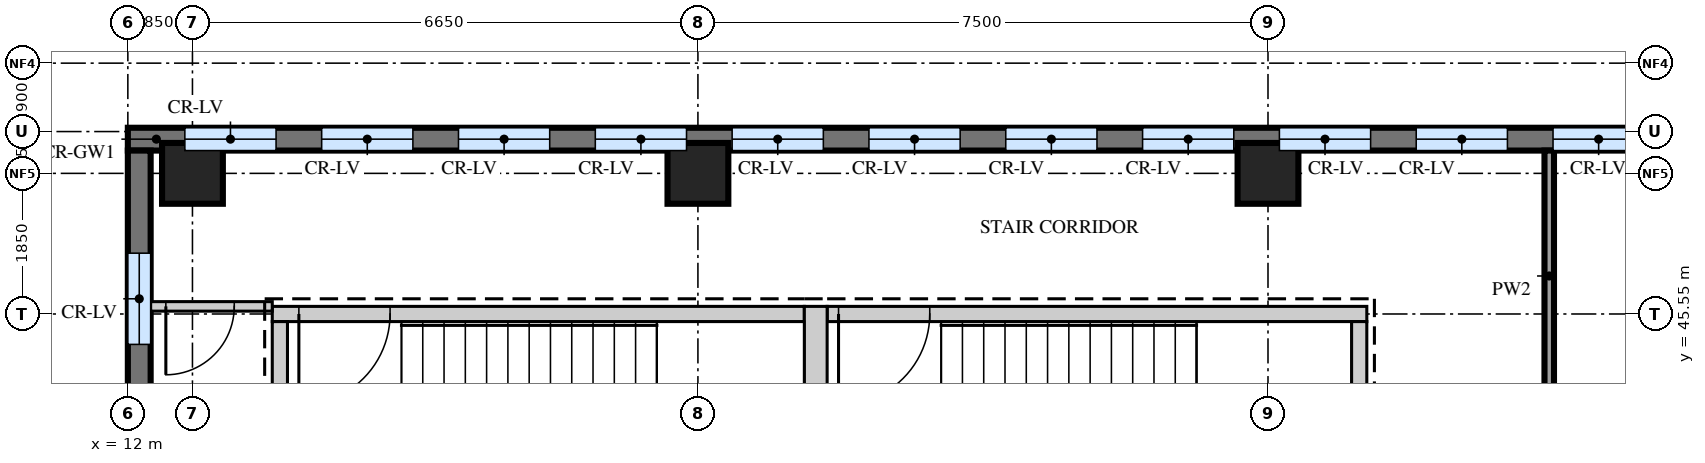
"""IFC4 building model, lengths in metres.
Left out: names, types, materials, properties, quantities, classifications, styles, units other than length and angle.
Written with IfcOpenShell. Run it as: python <this file> out.ifc"""

import sys

from ifc_helpers import new_model, si_unit, direction, frame, frame_2d, origin, origin_2d, place, context, subcontext, project, spatial, rectangle, extrude, source, transform, mapped, element, fill, save


model = new_model("IFC4")
c1 = context("Model", 3, precision=1e-05, world=origin(), true_north=direction((0.0, 1.0)))
c2 = subcontext(c1, "Body", "Model", "MODEL_VIEW")
j1 = project(units=[si_unit("LENGTHUNIT", "METRE"), si_unit("PLANEANGLEUNIT", "RADIAN")], contexts=[c1])
p1 = place(None, origin())
s1 = spatial("IfcSite", under=j1, at=p1, CompositionType="ELEMENT")
p2 = place(p1, origin())
s2 = spatial("IfcBuilding", under=s1, at=p2, CompositionType="ELEMENT")
p3 = place(p2, frame((0.0, 0.0, 330.2)))
s3 = spatial("IfcBuildingStorey", under=s2, at=p3, CompositionType="ELEMENT", Elevation=330.2)
m1 = source(origin(), c2, "Body", "SweptSolid", [
    extrude(rectangle(XDim=7.0, YDim=0.2, at=frame_2d((3.5, 0.0))), origin(), (0.0, 0.0, 1.0), 4.25),
])
p4 = place(p3, frame((13.9, 45.55, 0.0), z_axis=(0.0, 0.0, 1.0), x_axis=(1.0, 0.0, 0.0)))
e1 = element("IfcWall", 1, at=p4, inside=s3, PredefinedType="SHEAR", context=c2, shape_type="MappedRepresentation", body=[
    mapped(m1, transform((0.0, 0.0, 0.0))),
])
m2 = source(origin(), c2, "Body", "SweptSolid", [
    extrude(rectangle(XDim=1.2, YDim=2.1, at=frame_2d((0.6, 1.05))), frame((0.0, 0.11, 0.0), z_axis=(0.0, -1.0, 0.0), x_axis=(1.0, 0.0, 0.0)), (0.0, 0.0, 1.0), 0.22),
])
p5 = place(p4, frame((0.35, 0.0, 0.0)))
e2 = element("IfcOpeningElement", 2, at=p5, cuts=e1, PredefinedType="OPENING", context=c2, shape_type="MappedRepresentation", body=[
    mapped(m2, transform((0.0, 0.0, 0.0))),
])
m3 = source(origin(), c2, "Body", "SweptSolid", [
    extrude(rectangle(XDim=7.1, YDim=0.2, at=frame_2d((3.55, 0.0))), origin(), (0.0, 0.0, 1.0), 4.25),
])
p6 = place(p3, frame((21.2, 45.55, 0.0), z_axis=(0.0, 0.0, 1.0), x_axis=(1.0, 0.0, 0.0)))
e3 = element("IfcWall", 3, at=p6, inside=s3, PredefinedType="SHEAR", context=c2, shape_type="MappedRepresentation", body=[
    mapped(m3, transform((0.0, 0.0, 0.0))),
])
p7 = place(p6, frame((0.15, 0.0, 0.0)))
e4 = element("IfcOpeningElement", 4, at=p7, cuts=e3, PredefinedType="OPENING", context=c2, shape_type="MappedRepresentation", body=[
    mapped(m2, transform((0.0, 0.0, 0.0))),
])
m4 = source(origin(), c2, "Body", "SweptSolid", [
    extrude(rectangle(XDim=3.75, YDim=0.3, at=frame_2d((1.875, 0.0))), origin(), (0.0, 0.0, 1.0), 4.25),
])
p8 = place(p3, frame((21.05, 41.9, 0.0), z_axis=(0.0, 0.0, 1.0), x_axis=(0.0, 1.0, 0.0)))
e5 = element("IfcWall", 5, at=p8, inside=s3, PredefinedType="SHEAR", context=c2, shape_type="MappedRepresentation", body=[
    mapped(m4, transform((0.0, 0.0, 0.0))),
])
m5 = source(origin(), c2, "Body", "SweptSolid", [
    extrude(rectangle(XDim=3.35, YDim=0.2, at=frame_2d((1.675, 0.0))), origin(), (0.0, 0.0, 1.0), 4.25),
])
for number, where, z_axis, x_axis in (
    (6, (14.0, 42.1, 0.0), (0.0, 0.0, 1.0), (0.0, 1.0, 0.0)),
    (7, (28.2, 42.1, 0.0), (0.0, 0.0, 1.0), (0.0, 1.0, 0.0)),
):
    element("IfcWall", number, at=place(p3, frame(where, z_axis=z_axis, x_axis=x_axis)), inside=s3, PredefinedType="SHEAR", context=c2, shape_type="MappedRepresentation", body=[
        mapped(m5, transform((0.0, 0.0, 0.0))),
    ])
m6 = source(origin(), c2, "Body", "SweptSolid", [
    extrude(rectangle(XDim=0.8, YDim=0.8, at=origin_2d()), origin(), (0.0, 0.0, 1.0), 4.5),
])
for number, where, z_axis, x_axis in (
    (8, (12.85, 47.4, 0.0), (0.0, 0.0, 1.0), (1.0, 0.0, 0.0)),
    (9, (19.5, 47.4, 0.0), (0.0, 0.0, 1.0), (1.0, 0.0, 0.0)),
    (10, (27.0, 47.4, 0.0), (0.0, 0.0, 1.0), (1.0, 0.0, 0.0)),
):
    element("IfcColumn", number, at=place(p3, frame(where, z_axis=z_axis, x_axis=x_axis)), inside=s3, PredefinedType="COLUMN", context=c2, shape_type="MappedRepresentation", body=[
        mapped(m6, transform((0.0, 0.0, 0.0))),
    ])
m7 = source(origin(), c2, "Body", "SweptSolid", [
    extrude(rectangle(XDim=29.7, YDim=0.3, at=frame_2d((14.85, 0.0))), origin(), (0.0, 0.0, 1.0), 4.5),
])
p9 = place(p3, frame((41.7, 47.85, 0.0), z_axis=(0.0, 0.0, 1.0), x_axis=(-1.0, 0.0, 0.0)))
e11 = element("IfcWall", 11, at=p9, inside=s3, PredefinedType="SOLIDWALL", context=c2, shape_type="MappedRepresentation", body=[
    mapped(m7, transform((0.0, 0.0, 0.0))),
])
m8 = source(origin(), c2, "Body", "SweptSolid", [
    extrude(rectangle(XDim=1.2, YDim=2.4, at=frame_2d((0.6, 1.2))), frame((0.0, 0.16, 0.0), z_axis=(0.0, -1.0, 0.0), x_axis=(1.0, 0.0, 0.0)), (0.0, 0.0, 1.0), 0.32),
])
p10 = place(p9, frame((0.75, 0.0, 0.9)))
e12 = element("IfcOpeningElement", 12, at=p10, cuts=e11, PredefinedType="OPENING", context=c2, shape_type="MappedRepresentation", body=[
    mapped(m8, transform((0.0, 0.0, 0.0))),
])
p11 = place(p9, frame((2.55, 0.0, 0.9)))
e13 = element("IfcOpeningElement", 13, at=p11, cuts=e11, PredefinedType="OPENING", context=c2, shape_type="MappedRepresentation", body=[
    mapped(m8, transform((0.0, 0.0, 0.0))),
])
p12 = place(p9, frame((4.35, 0.0, 0.9)))
e14 = element("IfcOpeningElement", 14, at=p12, cuts=e11, PredefinedType="OPENING", context=c2, shape_type="MappedRepresentation", body=[
    mapped(m8, transform((0.0, 0.0, 0.0))),
])
p13 = place(p9, frame((6.15, 0.0, 0.9)))
e15 = element("IfcOpeningElement", 15, at=p13, cuts=e11, PredefinedType="OPENING", context=c2, shape_type="MappedRepresentation", body=[
    mapped(m8, transform((0.0, 0.0, 0.0))),
])
p14 = place(p9, frame((7.95, 0.0, 0.9)))
e16 = element("IfcOpeningElement", 16, at=p14, cuts=e11, PredefinedType="OPENING", context=c2, shape_type="MappedRepresentation", body=[
    mapped(m8, transform((0.0, 0.0, 0.0))),
])
p15 = place(p9, frame((9.75, 0.0, 0.9)))
e17 = element("IfcOpeningElement", 17, at=p15, cuts=e11, PredefinedType="OPENING", context=c2, shape_type="MappedRepresentation", body=[
    mapped(m8, transform((0.0, 0.0, 0.0))),
])
p16 = place(p9, frame((11.55, 0.0, 0.9)))
e18 = element("IfcOpeningElement", 18, at=p16, cuts=e11, PredefinedType="OPENING", context=c2, shape_type="MappedRepresentation", body=[
    mapped(m8, transform((0.0, 0.0, 0.0))),
])
p17 = place(p9, frame((13.35, 0.0, 0.9)))
e19 = element("IfcOpeningElement", 19, at=p17, cuts=e11, PredefinedType="OPENING", context=c2, shape_type="MappedRepresentation", body=[
    mapped(m8, transform((0.0, 0.0, 0.0))),
])
p18 = place(p9, frame((15.15, 0.0, 0.9)))
e20 = element("IfcOpeningElement", 20, at=p18, cuts=e11, PredefinedType="OPENING", context=c2, shape_type="MappedRepresentation", body=[
    mapped(m8, transform((0.0, 0.0, 0.0))),
])
p19 = place(p9, frame((16.95, 0.0, 0.9)))
e21 = element("IfcOpeningElement", 21, at=p19, cuts=e11, PredefinedType="OPENING", context=c2, shape_type="MappedRepresentation", body=[
    mapped(m8, transform((0.0, 0.0, 0.0))),
])
p20 = place(p9, frame((18.75, 0.0, 0.9)))
e22 = element("IfcOpeningElement", 22, at=p20, cuts=e11, PredefinedType="OPENING", context=c2, shape_type="MappedRepresentation", body=[
    mapped(m8, transform((0.0, 0.0, 0.0))),
])
p21 = place(p9, frame((20.55, 0.0, 0.9)))
e23 = element("IfcOpeningElement", 23, at=p21, cuts=e11, PredefinedType="OPENING", context=c2, shape_type="MappedRepresentation", body=[
    mapped(m8, transform((0.0, 0.0, 0.0))),
])
p22 = place(p9, frame((22.35, 0.0, 0.9)))
e24 = element("IfcOpeningElement", 24, at=p22, cuts=e11, PredefinedType="OPENING", context=c2, shape_type="MappedRepresentation", body=[
    mapped(m8, transform((0.0, 0.0, 0.0))),
])
p23 = place(p9, frame((24.15, 0.0, 0.9)))
e25 = element("IfcOpeningElement", 25, at=p23, cuts=e11, PredefinedType="OPENING", context=c2, shape_type="MappedRepresentation", body=[
    mapped(m8, transform((0.0, 0.0, 0.0))),
])
p24 = place(p9, frame((25.95, 0.0, 0.9)))
e26 = element("IfcOpeningElement", 26, at=p24, cuts=e11, PredefinedType="OPENING", context=c2, shape_type="MappedRepresentation", body=[
    mapped(m8, transform((0.0, 0.0, 0.0))),
])
p25 = place(p9, frame((27.75, 0.0, 0.9)))
e27 = element("IfcOpeningElement", 27, at=p25, cuts=e11, PredefinedType="OPENING", context=c2, shape_type="MappedRepresentation", body=[
    mapped(m8, transform((0.0, 0.0, 0.0))),
])
m9 = source(origin(), c2, "Body", "SweptSolid", [
    extrude(rectangle(XDim=5.7, YDim=0.3, at=frame_2d((2.85, 0.0))), origin(), (0.0, 0.0, 1.0), 4.5),
])
p26 = place(p3, frame((12.15, 47.7, 0.0), z_axis=(0.0, 0.0, 1.0), x_axis=(0.0, -1.0, 0.0)))
e28 = element("IfcWall", 28, at=p26, inside=s3, PredefinedType="SOLIDWALL", context=c2, shape_type="MappedRepresentation", body=[
    mapped(m9, transform((0.0, 0.0, 0.0))),
])
p27 = place(p26, frame((1.35, 0.0, 0.9)))
e29 = element("IfcOpeningElement", 29, at=p27, cuts=e28, PredefinedType="OPENING", context=c2, shape_type="MappedRepresentation", body=[
    mapped(m8, transform((0.0, 0.0, 0.0))),
])
p28 = place(p26, frame((3.15, 0.0, 0.9)))
e30 = element("IfcOpeningElement", 30, at=p28, cuts=e28, PredefinedType="OPENING", context=c2, shape_type="MappedRepresentation", body=[
    mapped(m8, transform((0.0, 0.0, 0.0))),
])
m10 = source(origin(), c2, "Body", "SweptSolid", [
    extrude(rectangle(XDim=8.6, YDim=0.125, at=frame_2d((4.3, 0.0))), origin(), (0.0, 0.0, 1.0), 4.3),
])
p29 = place(p3, frame((30.7, 39.1, 0.0), z_axis=(0.0, 0.0, 1.0), x_axis=(0.0, 1.0, 0.0)))
e31 = element("IfcWall", 31, at=p29, inside=s3, PredefinedType="PARTITIONING", context=c2, shape_type="MappedRepresentation", body=[
    mapped(m10, transform((0.0, 0.0, 0.0))),
])
m11 = source(origin(), c2, "Body", "SweptSolid", [
    extrude(rectangle(XDim=0.9, YDim=2.1, at=frame_2d((0.45, 1.05))), frame((0.0, 0.073, 0.0), z_axis=(0.0, -1.0, 0.0), x_axis=(1.0, 0.0, 0.0)), (0.0, 0.0, 1.0), 0.145),
])
p30 = place(p29, frame((0.8, 0.0, 0.0)))
e32 = element("IfcOpeningElement", 32, at=p30, cuts=e31, PredefinedType="OPENING", context=c2, shape_type="MappedRepresentation", body=[
    mapped(m11, transform((0.0, 0.0, 0.0))),
])
m12 = source(origin(), c2, "Body", "SweptSolid", [
    extrude(rectangle(XDim=1.2, YDim=2.1, at=frame_2d((0.6, 1.05))), frame((0.0, 0.073, 0.0), z_axis=(0.0, -1.0, 0.0), x_axis=(1.0, 0.0, 0.0)), (0.0, 0.0, 1.0), 0.145),
])
p31 = place(p29, frame((4.1, 0.0, 0.0)))
e33 = element("IfcOpeningElement", 33, at=p31, cuts=e31, PredefinedType="OPENING", context=c2, shape_type="MappedRepresentation", body=[
    mapped(m12, transform((0.0, 0.0, 0.0))),
])
m13 = source(origin(), c2, "Body", "SweptSolid", [
    extrude(rectangle(XDim=1.6, YDim=0.125, at=frame_2d((0.8, 0.0))), origin(), (0.0, 0.0, 1.0), 4.3),
])
p32 = place(p3, frame((12.3, 45.65, 0.0), z_axis=(0.0, 0.0, 1.0), x_axis=(1.0, 0.0, 0.0)))
e34 = element("IfcWall", 34, at=p32, inside=s3, PredefinedType="PARTITIONING", context=c2, shape_type="MappedRepresentation", body=[
    mapped(m13, transform((0.0, 0.0, 0.0))),
])
p33 = place(p32, frame((0.2, 0.0, 0.0)))
e35 = element("IfcOpeningElement", 35, at=p33, cuts=e34, PredefinedType="OPENING", context=c2, shape_type="MappedRepresentation", body=[
    mapped(m11, transform((0.0, 0.0, 0.0))),
])
m14 = source(origin(), c2, "Body", "SweptSolid", [
    extrude(rectangle(XDim=1.2, YDim=2.4, at=frame_2d((0.6, 1.2))), frame((0.0, 0.03, 0.0), z_axis=(0.0, -1.0, 0.0), x_axis=(1.0, 0.0, 0.0)), (0.0, 0.0, 1.0), 0.06),
])
p34 = place(p15, origin())
e36 = element("IfcWindow", 36, at=p34, inside=s3, PartitioningType="SINGLE_PANEL", PredefinedType="WINDOW", context=c2, shape_type="MappedRepresentation", body=[
    mapped(m14, transform((0.0, 0.0, 0.0))),
])
fill(e17, e36)
p35 = place(p16, origin())
e37 = element("IfcWindow", 37, at=p35, inside=s3, PartitioningType="SINGLE_PANEL", PredefinedType="WINDOW", context=c2, shape_type="MappedRepresentation", body=[
    mapped(m14, transform((0.0, 0.0, 0.0))),
])
fill(e18, e37)
p36 = place(p17, origin())
e38 = element("IfcWindow", 38, at=p36, inside=s3, PartitioningType="SINGLE_PANEL", PredefinedType="WINDOW", context=c2, shape_type="MappedRepresentation", body=[
    mapped(m14, transform((0.0, 0.0, 0.0))),
])
fill(e19, e38)
p37 = place(p18, origin())
e39 = element("IfcWindow", 39, at=p37, inside=s3, PartitioningType="SINGLE_PANEL", PredefinedType="WINDOW", context=c2, shape_type="MappedRepresentation", body=[
    mapped(m14, transform((0.0, 0.0, 0.0))),
])
fill(e20, e39)
p38 = place(p19, origin())
e40 = element("IfcWindow", 40, at=p38, inside=s3, PartitioningType="SINGLE_PANEL", PredefinedType="WINDOW", context=c2, shape_type="MappedRepresentation", body=[
    mapped(m14, transform((0.0, 0.0, 0.0))),
])
fill(e21, e40)
p39 = place(p20, origin())
e41 = element("IfcWindow", 41, at=p39, inside=s3, PartitioningType="SINGLE_PANEL", PredefinedType="WINDOW", context=c2, shape_type="MappedRepresentation", body=[
    mapped(m14, transform((0.0, 0.0, 0.0))),
])
fill(e22, e41)
p40 = place(p21, origin())
e42 = element("IfcWindow", 42, at=p40, inside=s3, PartitioningType="SINGLE_PANEL", PredefinedType="WINDOW", context=c2, shape_type="MappedRepresentation", body=[
    mapped(m14, transform((0.0, 0.0, 0.0))),
])
fill(e23, e42)
p41 = place(p22, origin())
e43 = element("IfcWindow", 43, at=p41, inside=s3, PartitioningType="SINGLE_PANEL", PredefinedType="WINDOW", context=c2, shape_type="MappedRepresentation", body=[
    mapped(m14, transform((0.0, 0.0, 0.0))),
])
fill(e24, e43)
p42 = place(p23, origin())
e44 = element("IfcWindow", 44, at=p42, inside=s3, PartitioningType="SINGLE_PANEL", PredefinedType="WINDOW", context=c2, shape_type="MappedRepresentation", body=[
    mapped(m14, transform((0.0, 0.0, 0.0))),
])
fill(e25, e44)
p43 = place(p24, origin())
e45 = element("IfcWindow", 45, at=p43, inside=s3, PartitioningType="SINGLE_PANEL", PredefinedType="WINDOW", context=c2, shape_type="MappedRepresentation", body=[
    mapped(m14, transform((0.0, 0.0, 0.0))),
])
fill(e26, e45)
p44 = place(p25, origin())
e46 = element("IfcWindow", 46, at=p44, inside=s3, PartitioningType="SINGLE_PANEL", PredefinedType="WINDOW", context=c2, shape_type="MappedRepresentation", body=[
    mapped(m14, transform((0.0, 0.0, 0.0))),
])
fill(e27, e46)
p45 = place(p27, origin())
e47 = element("IfcWindow", 47, at=p45, inside=s3, PartitioningType="SINGLE_PANEL", PredefinedType="WINDOW", context=c2, shape_type="MappedRepresentation", body=[
    mapped(m14, transform((0.0, 0.0, 0.0))),
])
fill(e29, e47)
m15 = source(origin(), c2, "Body", "SweptSolid", [
    extrude(rectangle(XDim=0.9, YDim=2.1, at=frame_2d((0.45, 1.05))), frame((0.0, 0.025, 0.0), z_axis=(0.0, -1.0, 0.0), x_axis=(1.0, 0.0, 0.0)), (0.0, 0.0, 1.0), 0.05),
])
p46 = place(p33, origin())
e48 = element("IfcDoor", 48, at=p46, inside=s3, OperationType="SINGLE_SWING_LEFT", PredefinedType="DOOR", context=c2, shape_type="MappedRepresentation", body=[
    mapped(m15, transform((0.0, 0.0, 0.0))),
])
fill(e35, e48)
m16 = source(origin(), c2, "Body", "SweptSolid", [
    extrude(rectangle(XDim=1.2, YDim=2.1, at=frame_2d((0.6, 1.05))), frame((0.0, 0.025, 0.0), z_axis=(0.0, -1.0, 0.0), x_axis=(1.0, 0.0, 0.0)), (0.0, 0.0, 1.0), 0.05),
])
p47 = place(p5, origin())
e49 = element("IfcDoor", 49, at=p47, inside=s3, OperationType="SINGLE_SWING_LEFT", PredefinedType="DOOR", context=c2, shape_type="MappedRepresentation", body=[
    mapped(m16, transform((0.0, 0.0, 0.0))),
])
fill(e2, e49)
p48 = place(p7, origin())
e50 = element("IfcDoor", 50, at=p48, inside=s3, OperationType="SINGLE_SWING_LEFT", PredefinedType="DOOR", context=c2, shape_type="MappedRepresentation", body=[
    mapped(m16, transform((0.0, 0.0, 0.0))),
])
fill(e4, e50)
save(model, sys.argv[1])
